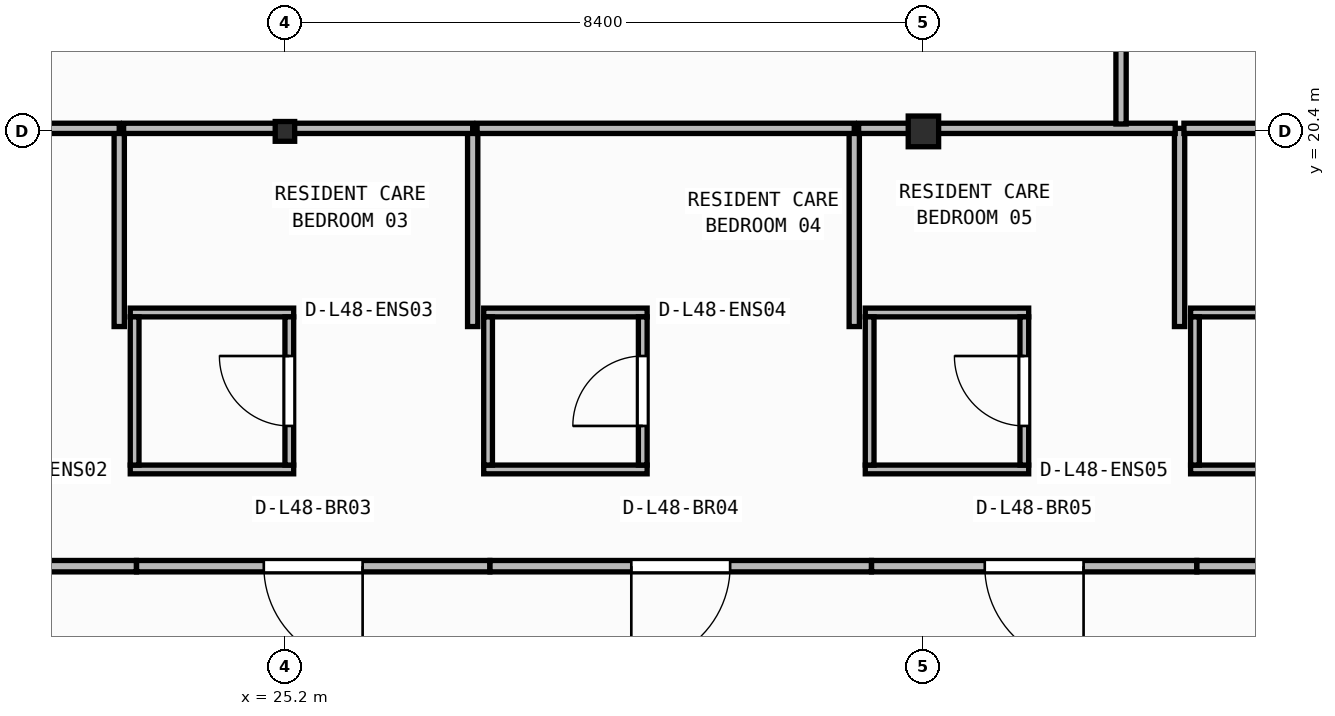
"""IFC4 building model, lengths in metres.
Left out: names, types, materials, properties, quantities, classifications, styles, units other than length and angle.
Written with IfcOpenShell. Run it as: python <this file> out.ifc"""

import sys

from ifc_helpers import new_model, si_unit, direction, frame, frame_2d, origin, origin_2d, place, context, subcontext, project, spatial, rectangle, i_section, extrude, element, fill, save


model = new_model("IFC4")
c1 = context("Model", 3, precision=1e-05, world=origin(), true_north=direction((0.0, 1.0)))
c2 = subcontext(c1, "Body", "Model", "MODEL_VIEW")
j1 = project(units=[si_unit("LENGTHUNIT", "METRE"), si_unit("PLANEANGLEUNIT", "RADIAN")], contexts=[c1])
p1 = place(None, origin())
s1 = spatial("IfcSite", under=j1, at=p1, CompositionType="ELEMENT")
p2 = place(p1, origin())
s2 = spatial("IfcBuilding", under=s1, at=p2, CompositionType="ELEMENT")
p3 = place(p2, frame((0.0, 0.0, 196.05)))
s3 = spatial("IfcBuildingStorey", under=s2, at=p3, CompositionType="ELEMENT", Elevation=196.05)
p4 = place(p3, frame((25.2, 20.4, 0.0), z_axis=(0.0, 0.0, 1.0), x_axis=(1.0, 0.0, 0.0)))
e1 = element("IfcColumn", 1, at=p4, inside=s3, PredefinedType="COLUMN", context=c2, shape_type="SweptSolid", body=[
    extrude(i_section(OverallWidth=0.256, OverallDepth=0.26, WebThickness=0.01, FlangeThickness=0.017, FilletRadius=0.013, at=origin_2d()), origin(), (0.0, 0.0, 1.0), 3.95),
])
p5 = place(p3, frame((33.6, 20.4, 0.0), z_axis=(0.0, 0.0, 1.0), x_axis=(1.0, 0.0, 0.0)))
e2 = element("IfcColumn", 2, at=p5, inside=s3, PredefinedType="COLUMN", context=c2, shape_type="SweptSolid", body=[
    extrude(i_section(OverallWidth=0.4, OverallDepth=0.404, WebThickness=0.02, FlangeThickness=0.032, at=origin_2d()), origin(), (0.0, 0.0, 1.0), 3.95),
])
p6 = place(p3, frame((23.165, 15.952, 0.0), z_axis=(0.0, 0.0, 1.0), x_axis=(1.0, 0.0, 0.0)))
e3 = element("IfcWall", 3, at=p6, inside=s3, PredefinedType="PARTITIONING", context=c2, shape_type="SweptSolid", body=[
    extrude(rectangle(XDim=2.15, YDim=0.115, at=frame_2d((1.075, 0.0))), origin(), (0.0, 0.0, 1.0), 3.478),
])
p7 = place(p3, frame((23.165, 18.018, 0.0), z_axis=(0.0, 0.0, 1.0), x_axis=(1.0, 0.0, 0.0)))
e4 = element("IfcWall", 4, at=p7, inside=s3, PredefinedType="PARTITIONING", context=c2, shape_type="SweptSolid", body=[
    extrude(rectangle(XDim=2.15, YDim=0.115, at=frame_2d((1.075, 0.0))), origin(), (0.0, 0.0, 1.0), 3.71),
])
p8 = place(p3, frame((23.222, 16.01, 0.0), z_axis=(0.0, 0.0, 1.0), x_axis=(0.0, 1.0, 0.0)))
e5 = element("IfcWall", 5, at=p8, inside=s3, PredefinedType="PARTITIONING", context=c2, shape_type="SweptSolid", body=[
    extrude(rectangle(XDim=1.95, YDim=0.115, at=frame_2d((0.975, 0.0))), origin(), (0.0, 0.0, 1.0), 3.71),
])
p9 = place(p3, frame((25.258, 16.01, 0.0), z_axis=(0.0, 0.0, 1.0), x_axis=(0.0, 1.0, 0.0)))
e6 = element("IfcWall", 6, at=p9, inside=s3, PredefinedType="PARTITIONING", context=c2, shape_type="SweptSolid", body=[
    extrude(rectangle(XDim=1.95, YDim=0.115, at=frame_2d((0.975, 0.0))), origin(), (0.0, 0.0, 1.0), 3.152),
])
p10 = place(p9, frame((0.515, 0.0, 0.0)))
e7 = element("IfcOpeningElement", 7, at=p10, cuts=e6, PredefinedType="OPENING", context=c2, shape_type="SweptSolid", body=[
    extrude(rectangle(XDim=0.92, YDim=2.1, at=frame_2d((0.46, 1.05))), frame((0.0, 0.067, 0.0), z_axis=(0.0, -1.0, 0.0), x_axis=(1.0, 0.0, 0.0)), (0.0, 0.0, 1.0), 0.135),
])
p11 = place(p3, frame((27.815, 15.952, 0.0), z_axis=(0.0, 0.0, 1.0), x_axis=(1.0, 0.0, 0.0)))
e8 = element("IfcWall", 8, at=p11, inside=s3, PredefinedType="PARTITIONING", context=c2, shape_type="SweptSolid", body=[
    extrude(rectangle(XDim=2.15, YDim=0.115, at=frame_2d((1.075, 0.0))), origin(), (0.0, 0.0, 1.0), 3.478),
])
p12 = place(p3, frame((27.815, 18.018, 0.0), z_axis=(0.0, 0.0, 1.0), x_axis=(1.0, 0.0, 0.0)))
e9 = element("IfcWall", 9, at=p12, inside=s3, PredefinedType="PARTITIONING", context=c2, shape_type="SweptSolid", body=[
    extrude(rectangle(XDim=2.15, YDim=0.115, at=frame_2d((1.075, 0.0))), origin(), (0.0, 0.0, 1.0), 3.71),
])
p13 = place(p3, frame((27.873, 16.01, 0.0), z_axis=(0.0, 0.0, 1.0), x_axis=(0.0, 1.0, 0.0)))
e10 = element("IfcWall", 10, at=p13, inside=s3, PredefinedType="PARTITIONING", context=c2, shape_type="SweptSolid", body=[
    extrude(rectangle(XDim=1.95, YDim=0.115, at=frame_2d((0.975, 0.0))), origin(), (0.0, 0.0, 1.0), 3.71),
])
p14 = place(p3, frame((29.907, 16.01, 0.0), z_axis=(0.0, 0.0, 1.0), x_axis=(0.0, 1.0, 0.0)))
e11 = element("IfcWall", 11, at=p14, inside=s3, PredefinedType="PARTITIONING", context=c2, shape_type="SweptSolid", body=[
    extrude(rectangle(XDim=1.95, YDim=0.115, at=frame_2d((0.975, 0.0))), origin(), (0.0, 0.0, 1.0), 3.71),
])
p15 = place(p14, frame((0.515, 0.0, 0.0)))
e12 = element("IfcOpeningElement", 12, at=p15, cuts=e11, PredefinedType="OPENING", context=c2, shape_type="SweptSolid", body=[
    extrude(rectangle(XDim=0.92, YDim=2.1, at=frame_2d((0.46, 1.05))), frame((0.0, 0.067, 0.0), z_axis=(0.0, -1.0, 0.0), x_axis=(1.0, 0.0, 0.0)), (0.0, 0.0, 1.0), 0.135),
])
p16 = place(p3, frame((32.835, 15.952, 0.0), z_axis=(0.0, 0.0, 1.0), x_axis=(1.0, 0.0, 0.0)))
e13 = element("IfcWall", 13, at=p16, inside=s3, PredefinedType="PARTITIONING", context=c2, shape_type="SweptSolid", body=[
    extrude(rectangle(XDim=2.15, YDim=0.115, at=frame_2d((1.075, 0.0))), origin(), (0.0, 0.0, 1.0), 3.478),
])
p17 = place(p3, frame((32.835, 18.018, 0.0), z_axis=(0.0, 0.0, 1.0), x_axis=(1.0, 0.0, 0.0)))
e14 = element("IfcWall", 14, at=p17, inside=s3, PredefinedType="PARTITIONING", context=c2, shape_type="SweptSolid", body=[
    extrude(rectangle(XDim=2.15, YDim=0.115, at=frame_2d((1.075, 0.0))), origin(), (0.0, 0.0, 1.0), 3.71),
])
p18 = place(p3, frame((32.893, 16.01, 0.0), z_axis=(0.0, 0.0, 1.0), x_axis=(0.0, 1.0, 0.0)))
e15 = element("IfcWall", 15, at=p18, inside=s3, PredefinedType="PARTITIONING", context=c2, shape_type="SweptSolid", body=[
    extrude(rectangle(XDim=1.95, YDim=0.115, at=frame_2d((0.975, 0.0))), origin(), (0.0, 0.0, 1.0), 3.71),
])
p19 = place(p3, frame((34.927, 16.01, 0.0), z_axis=(0.0, 0.0, 1.0), x_axis=(0.0, 1.0, 0.0)))
e16 = element("IfcWall", 16, at=p19, inside=s3, PredefinedType="PARTITIONING", context=c2, shape_type="SweptSolid", body=[
    extrude(rectangle(XDim=1.95, YDim=0.115, at=frame_2d((0.975, 0.0))), origin(), (0.0, 0.0, 1.0), 3.71),
])
p20 = place(p19, frame((0.515, 0.0, 0.0)))
e17 = element("IfcOpeningElement", 17, at=p20, cuts=e16, PredefinedType="OPENING", context=c2, shape_type="SweptSolid", body=[
    extrude(rectangle(XDim=0.92, YDim=2.1, at=frame_2d((0.46, 1.05))), frame((0.0, 0.067, 0.0), z_axis=(0.0, -1.0, 0.0), x_axis=(1.0, 0.0, 0.0)), (0.0, 0.0, 1.0), 0.135),
])
p21 = place(p3, frame((37.115, 15.952, 0.0), z_axis=(0.0, 0.0, 1.0), x_axis=(1.0, 0.0, 0.0)))
e18 = element("IfcWall", 18, at=p21, inside=s3, PredefinedType="PARTITIONING", context=c2, shape_type="SweptSolid", body=[
    extrude(rectangle(XDim=2.15, YDim=0.115, at=frame_2d((1.075, 0.0))), origin(), (0.0, 0.0, 1.0), 3.478),
])
p22 = place(p3, frame((37.115, 18.018, 0.0), z_axis=(0.0, 0.0, 1.0), x_axis=(1.0, 0.0, 0.0)))
e19 = element("IfcWall", 19, at=p22, inside=s3, PredefinedType="PARTITIONING", context=c2, shape_type="SweptSolid", body=[
    extrude(rectangle(XDim=2.15, YDim=0.115, at=frame_2d((1.075, 0.0))), origin(), (0.0, 0.0, 1.0), 3.71),
])
p23 = place(p3, frame((37.173, 16.01, 0.0), z_axis=(0.0, 0.0, 1.0), x_axis=(0.0, 1.0, 0.0)))
e20 = element("IfcWall", 20, at=p23, inside=s3, PredefinedType="PARTITIONING", context=c2, shape_type="SweptSolid", body=[
    extrude(rectangle(XDim=1.95, YDim=0.115, at=frame_2d((0.975, 0.0))), origin(), (0.0, 0.0, 1.0), 3.71),
])
p24 = place(p3, frame((23.246, 14.68, 0.0), z_axis=(0.0, 0.0, 1.0), x_axis=(-1.0, 0.0, 0.0)))
e21 = element("IfcWall", 21, at=p24, inside=s3, PredefinedType="PARTITIONING", context=c2, shape_type="SweptSolid", body=[
    extrude(rectangle(XDim=4.278, YDim=0.15, at=frame_2d((2.139, 0.0))), origin(), (0.0, 0.0, 1.0), 3.71),
])
p25 = place(p24, frame((1.489, 0.0, 0.0)))
e22 = element("IfcOpeningElement", 22, at=p25, cuts=e21, PredefinedType="OPENING", context=c2, shape_type="SweptSolid", body=[
    extrude(rectangle(XDim=1.3, YDim=2.15, at=frame_2d((0.65, 1.075))), frame((0.0, 0.085, 0.0), z_axis=(0.0, -1.0, 0.0), x_axis=(1.0, 0.0, 0.0)), (0.0, 0.0, 1.0), 0.17),
])
p26 = place(p3, frame((27.896, 14.68, 0.0), z_axis=(0.0, 0.0, 1.0), x_axis=(-1.0, 0.0, 0.0)))
e23 = element("IfcWall", 23, at=p26, inside=s3, PredefinedType="PARTITIONING", context=c2, shape_type="SweptSolid", body=[
    extrude(rectangle(XDim=4.648, YDim=0.15, at=frame_2d((2.324, 0.0))), origin(), (0.0, 0.0, 1.0), 3.71),
])
p27 = place(p26, frame((1.674, 0.0, 0.0)))
e24 = element("IfcOpeningElement", 24, at=p27, cuts=e23, PredefinedType="OPENING", context=c2, shape_type="SweptSolid", body=[
    extrude(rectangle(XDim=1.3, YDim=2.15, at=frame_2d((0.65, 1.075))), frame((0.0, 0.085, 0.0), z_axis=(0.0, -1.0, 0.0), x_axis=(1.0, 0.0, 0.0)), (0.0, 0.0, 1.0), 0.17),
])
p28 = place(p3, frame((32.916, 14.68, 0.0), z_axis=(0.0, 0.0, 1.0), x_axis=(-1.0, 0.0, 0.0)))
e25 = element("IfcWall", 25, at=p28, inside=s3, PredefinedType="PARTITIONING", context=c2, shape_type="SweptSolid", body=[
    extrude(rectangle(XDim=5.018, YDim=0.15, at=frame_2d((2.509, 0.0))), origin(), (0.0, 0.0, 1.0), 3.71),
])
p29 = place(p28, frame((1.859, 0.0, 0.0)))
e26 = element("IfcOpeningElement", 26, at=p29, cuts=e25, PredefinedType="OPENING", context=c2, shape_type="SweptSolid", body=[
    extrude(rectangle(XDim=1.3, YDim=2.15, at=frame_2d((0.65, 1.075))), frame((0.0, 0.085, 0.0), z_axis=(0.0, -1.0, 0.0), x_axis=(1.0, 0.0, 0.0)), (0.0, 0.0, 1.0), 0.17),
])
p30 = place(p3, frame((37.196, 14.68, 0.0), z_axis=(0.0, 0.0, 1.0), x_axis=(-1.0, 0.0, 0.0)))
e27 = element("IfcWall", 27, at=p30, inside=s3, PredefinedType="PARTITIONING", context=c2, shape_type="SweptSolid", body=[
    extrude(rectangle(XDim=4.278, YDim=0.15, at=frame_2d((2.139, 0.0))), origin(), (0.0, 0.0, 1.0), 3.71),
])
p31 = place(p30, frame((1.489, 0.0, 0.0)))
e28 = element("IfcOpeningElement", 28, at=p31, cuts=e27, PredefinedType="OPENING", context=c2, shape_type="SweptSolid", body=[
    extrude(rectangle(XDim=1.3, YDim=2.15, at=frame_2d((0.65, 1.075))), frame((0.0, 0.085, 0.0), z_axis=(0.0, -1.0, 0.0), x_axis=(1.0, 0.0, 0.0)), (0.0, 0.0, 1.0), 0.17),
])
p32 = place(p3, frame((41.846, 14.68, 0.0), z_axis=(0.0, 0.0, 1.0), x_axis=(-1.0, 0.0, 0.0)))
e29 = element("IfcWall", 29, at=p32, inside=s3, PredefinedType="PARTITIONING", context=c2, shape_type="SweptSolid", body=[
    extrude(rectangle(XDim=4.648, YDim=0.15, at=frame_2d((2.324, 0.0))), origin(), (0.0, 0.0, 1.0), 3.71),
])
p33 = place(p32, frame((1.674, 0.0, 0.0)))
e30 = element("IfcOpeningElement", 30, at=p33, cuts=e29, PredefinedType="OPENING", context=c2, shape_type="SweptSolid", body=[
    extrude(rectangle(XDim=1.3, YDim=2.15, at=frame_2d((0.65, 1.075))), frame((0.0, 0.085, 0.0), z_axis=(0.0, -1.0, 0.0), x_axis=(1.0, 0.0, 0.0)), (0.0, 0.0, 1.0), 0.17),
])
p34 = place(p3, frame((23.02, 17.833, 0.0), z_axis=(0.0, 0.0, 1.0), x_axis=(0.0, 1.0, 0.0)))
e31 = element("IfcWall", 31, at=p34, inside=s3, PredefinedType="PARTITIONING", context=c2, shape_type="SweptSolid", body=[
    extrude(rectangle(XDim=2.607, YDim=0.135, at=frame_2d((1.304, 0.0))), origin(), (0.0, 0.0, 1.0), 3.71),
])
p35 = place(p3, frame((23.02, 20.44, 0.0), z_axis=(0.0, 0.0, 1.0), x_axis=(-1.0, 0.0, 0.0)))
e32 = element("IfcWall", 32, at=p35, inside=s3, PredefinedType="PARTITIONING", context=c2, shape_type="SweptSolid", body=[
    extrude(rectangle(XDim=4.222, YDim=0.135, at=frame_2d((2.111, 0.0))), origin(), (0.0, 0.0, 1.0), 3.152),
])
p36 = place(p3, frame((27.67, 17.833, 0.0), z_axis=(0.0, 0.0, 1.0), x_axis=(0.0, 1.0, 0.0)))
e33 = element("IfcWall", 33, at=p36, inside=s3, PredefinedType="PARTITIONING", context=c2, shape_type="SweptSolid", body=[
    extrude(rectangle(XDim=2.607, YDim=0.135, at=frame_2d((1.304, 0.0))), origin(), (0.0, 0.0, 1.0), 3.71),
])
p37 = place(p3, frame((27.67, 20.44, 0.0), z_axis=(0.0, 0.0, 1.0), x_axis=(-1.0, 0.0, 0.0)))
e34 = element("IfcWall", 34, at=p37, inside=s3, PredefinedType="PARTITIONING", context=c2, shape_type="SweptSolid", body=[
    extrude(rectangle(XDim=4.593, YDim=0.135, at=frame_2d((2.296, 0.0))), origin(), (0.0, 0.0, 1.0), 3.152),
])
p38 = place(p3, frame((32.69, 17.833, 0.0), z_axis=(0.0, 0.0, 1.0), x_axis=(0.0, 1.0, 0.0)))
e35 = element("IfcWall", 35, at=p38, inside=s3, PredefinedType="PARTITIONING", context=c2, shape_type="SweptSolid", body=[
    extrude(rectangle(XDim=2.607, YDim=0.135, at=frame_2d((1.304, 0.0))), origin(), (0.0, 0.0, 1.0), 3.71),
])
p39 = place(p3, frame((32.69, 20.44, 0.0), z_axis=(0.0, 0.0, 1.0), x_axis=(-1.0, 0.0, 0.0)))
e36 = element("IfcWall", 36, at=p39, inside=s3, PredefinedType="PARTITIONING", context=c2, shape_type="SweptSolid", body=[
    extrude(rectangle(XDim=4.962, YDim=0.135, at=frame_2d((2.481, 0.0))), origin(), (0.0, 0.0, 1.0), 3.152),
])
p40 = place(p3, frame((36.97, 17.833, 0.0), z_axis=(0.0, 0.0, 1.0), x_axis=(0.0, 1.0, 0.0)))
e37 = element("IfcWall", 37, at=p40, inside=s3, PredefinedType="PARTITIONING", context=c2, shape_type="SweptSolid", body=[
    extrude(rectangle(XDim=2.607, YDim=0.135, at=frame_2d((1.304, 0.0))), origin(), (0.0, 0.0, 1.0), 3.71),
])
p41 = place(p3, frame((36.913, 20.44, 0.0), z_axis=(0.0, 0.0, 1.0), x_axis=(-1.0, 0.0, 0.0)))
e38 = element("IfcWall", 38, at=p41, inside=s3, PredefinedType="PARTITIONING", context=c2, shape_type="SweptSolid", body=[
    extrude(rectangle(XDim=4.165, YDim=0.135, at=frame_2d((2.083, 0.0))), origin(), (0.0, 0.0, 1.0), 3.152),
])
p42 = place(p3, frame((41.62, 20.44, 0.0), z_axis=(0.0, 0.0, 1.0), x_axis=(-1.0, 0.0, 0.0)))
e39 = element("IfcWall", 39, at=p42, inside=s3, PredefinedType="PARTITIONING", context=c2, shape_type="SweptSolid", body=[
    extrude(rectangle(XDim=4.593, YDim=0.135, at=frame_2d((2.296, 0.0))), origin(), (0.0, 0.0, 1.0), 3.152),
])
p43 = place(p3, frame((36.2, 20.498, 0.0), z_axis=(0.0, 0.0, 1.0), x_axis=(0.0, 1.0, 0.0)))
e40 = element("IfcWall", 40, at=p43, inside=s3, PredefinedType="PARTITIONING", context=c2, shape_type="SweptSolid", body=[
    extrude(rectangle(XDim=6.642, YDim=0.135, at=frame_2d((3.321, 0.0))), origin(), (0.0, 0.0, 1.0), 3.71),
])
p44 = place(p43, frame((2.771, 0.0, 0.0)))
e41 = element("IfcOpeningElement", 41, at=p44, cuts=e40, PredefinedType="OPENING", context=c2, shape_type="SweptSolid", body=[
    extrude(rectangle(XDim=1.1, YDim=2.1, at=frame_2d((0.55, 1.05))), frame((0.0, 0.077, 0.0), z_axis=(0.0, -1.0, 0.0), x_axis=(1.0, 0.0, 0.0)), (0.0, 0.0, 1.0), 0.155),
])
p45 = place(p10, origin())
e42 = element("IfcDoor", 42, at=p45, inside=s3, OperationType="SINGLE_SWING_RIGHT", PredefinedType="DOOR", context=c2, shape_type="SweptSolid", body=[
    extrude(rectangle(XDim=0.92, YDim=2.1, at=frame_2d((0.46, 1.05))), frame((0.0, 0.025, 0.0), z_axis=(0.0, -1.0, 0.0), x_axis=(1.0, 0.0, 0.0)), (0.0, 0.0, 1.0), 0.05),
])
fill(e7, e42)
p46 = place(p15, origin())
e43 = element("IfcDoor", 43, at=p46, inside=s3, OperationType="SINGLE_SWING_LEFT", PredefinedType="DOOR", context=c2, shape_type="SweptSolid", body=[
    extrude(rectangle(XDim=0.92, YDim=2.1, at=frame_2d((0.46, 1.05))), frame((0.0, 0.025, 0.0), z_axis=(0.0, -1.0, 0.0), x_axis=(1.0, 0.0, 0.0)), (0.0, 0.0, 1.0), 0.05),
])
fill(e12, e43)
p47 = place(p20, origin())
e44 = element("IfcDoor", 44, at=p47, inside=s3, OperationType="SINGLE_SWING_RIGHT", PredefinedType="DOOR", context=c2, shape_type="SweptSolid", body=[
    extrude(rectangle(XDim=0.92, YDim=2.1, at=frame_2d((0.46, 1.05))), frame((0.0, 0.025, 0.0), z_axis=(0.0, -1.0, 0.0), x_axis=(1.0, 0.0, 0.0)), (0.0, 0.0, 1.0), 0.05),
])
fill(e17, e44)
p48 = place(p27, origin())
e45 = element("IfcDoor", 45, at=p48, inside=s3, OperationType="SINGLE_SWING_LEFT", PredefinedType="DOOR", context=c2, shape_type="SweptSolid", body=[
    extrude(rectangle(XDim=1.3, YDim=2.15, at=frame_2d((0.65, 1.075))), frame((0.0, 0.025, 0.0), z_axis=(0.0, -1.0, 0.0), x_axis=(1.0, 0.0, 0.0)), (0.0, 0.0, 1.0), 0.05),
])
fill(e24, e45)
p49 = place(p29, origin())
e46 = element("IfcDoor", 46, at=p49, inside=s3, OperationType="SINGLE_SWING_RIGHT", PredefinedType="DOOR", context=c2, shape_type="SweptSolid", body=[
    extrude(rectangle(XDim=1.3, YDim=2.15, at=frame_2d((0.65, 1.075))), frame((0.0, 0.025, 0.0), z_axis=(0.0, -1.0, 0.0), x_axis=(1.0, 0.0, 0.0)), (0.0, 0.0, 1.0), 0.05),
])
fill(e26, e46)
p50 = place(p31, origin())
e47 = element("IfcDoor", 47, at=p50, inside=s3, OperationType="SINGLE_SWING_LEFT", PredefinedType="DOOR", context=c2, shape_type="SweptSolid", body=[
    extrude(rectangle(XDim=1.3, YDim=2.15, at=frame_2d((0.65, 1.075))), frame((0.0, 0.025, 0.0), z_axis=(0.0, -1.0, 0.0), x_axis=(1.0, 0.0, 0.0)), (0.0, 0.0, 1.0), 0.05),
])
fill(e28, e47)
save(model, sys.argv[1])
